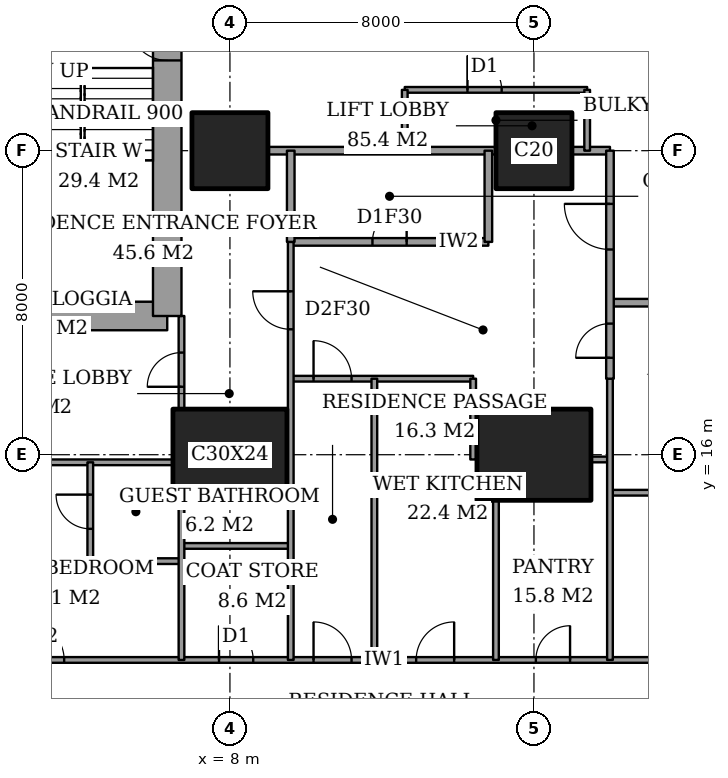
"""IFC4 building model, lengths in metres.
Left out: names, types, materials, properties, quantities, classifications, styles, units other than length and angle.
Written with IfcOpenShell. Run it as: python <this file> out.ifc"""

import sys

from ifc_helpers import new_model, si_unit, direction, frame, frame_2d, origin, origin_2d, place, context, subcontext, project, spatial, rectangle, extrude, element, fill, save


model = new_model("IFC4")
c1 = context("Model", 3, precision=1e-05, world=origin(), true_north=direction((0.0, 1.0)))
c2 = subcontext(c1, "Body", "Model", "MODEL_VIEW")
j1 = project(units=[si_unit("LENGTHUNIT", "METRE"), si_unit("PLANEANGLEUNIT", "RADIAN")], contexts=[c1])
p1 = place(None, origin())
s1 = spatial("IfcSite", under=j1, at=p1, CompositionType="ELEMENT")
p2 = place(p1, origin())
s2 = spatial("IfcBuilding", under=s1, at=p2, CompositionType="ELEMENT")
p3 = place(p2, frame((0.0, 0.0, 114.2)))
s3 = spatial("IfcBuildingStorey", under=s2, at=p3, CompositionType="ELEMENT", Elevation=114.2)
p4 = place(p3, frame((8.0, 16.0, 0.0), z_axis=(0.0, 0.0, 1.0), x_axis=(1.0, 0.0, 0.0)))
e1 = element("IfcColumn", 1, at=p4, inside=s3, PredefinedType="COLUMN", context=c2, shape_type="SweptSolid", body=[
    extrude(rectangle(XDim=3.0, YDim=2.4, at=origin_2d()), origin(), (0.0, 0.0, 1.0), 3.6),
])
p5 = place(p3, frame((8.0, 24.0, 0.0), z_axis=(0.0, 0.0, 1.0), x_axis=(1.0, 0.0, 0.0)))
e2 = element("IfcColumn", 2, at=p5, inside=s3, PredefinedType="COLUMN", context=c2, shape_type="SweptSolid", body=[
    extrude(rectangle(XDim=2.0, YDim=2.0, at=origin_2d()), origin(), (0.0, 0.0, 1.0), 3.6),
])
p6 = place(p3, frame((16.0, 16.0, 0.0), z_axis=(0.0, 0.0, 1.0), x_axis=(1.0, 0.0, 0.0)))
e3 = element("IfcColumn", 3, at=p6, inside=s3, PredefinedType="COLUMN", context=c2, shape_type="SweptSolid", body=[
    extrude(rectangle(XDim=3.0, YDim=2.4, at=origin_2d()), origin(), (0.0, 0.0, 1.0), 3.6),
])
p7 = place(p3, frame((16.0, 24.0, 0.0), z_axis=(0.0, 0.0, 1.0), x_axis=(1.0, 0.0, 0.0)))
e4 = element("IfcColumn", 4, at=p7, inside=s3, PredefinedType="COLUMN", context=c2, shape_type="SweptSolid", body=[
    extrude(rectangle(XDim=2.0, YDim=2.0, at=origin_2d()), origin(), (0.0, 0.0, 1.0), 3.6),
])
p8 = place(p3, frame((1.9, 19.65, 0.0), z_axis=(0.0, 0.0, 1.0), x_axis=(1.0, 0.0, 0.0)))
e5 = element("IfcWall", 5, at=p8, inside=s3, PredefinedType="SHEAR", context=c2, shape_type="SweptSolid", body=[
    extrude(rectangle(XDim=4.45, YDim=0.75, at=frame_2d((2.225, 0.0))), origin(), (0.0, 0.0, 1.0), 3.6),
])
p9 = place(p3, frame((6.35, 19.65, 0.0), z_axis=(0.0, 0.0, 1.0), x_axis=(0.0, 1.0, 0.0)))
e6 = element("IfcWall", 6, at=p9, inside=s3, PredefinedType="SHEAR", context=c2, shape_type="SweptSolid", body=[
    extrude(rectangle(XDim=8.7, YDim=0.75, at=frame_2d((4.35, 0.0))), origin(), (0.0, 0.0, 1.0), 3.6),
])
p10 = place(p9, frame((6.725, 0.0, 0.0)))
e7 = element("IfcOpeningElement", 7, at=p10, cuts=e6, PredefinedType="OPENING", context=c2, shape_type="SweptSolid", body=[
    extrude(rectangle(XDim=1.0, YDim=2.1, at=frame_2d((0.5, 1.05))), frame((0.0, 0.385, 0.0), z_axis=(0.0, -1.0, 0.0), x_axis=(1.0, 0.0, 0.0)), (0.0, 0.0, 1.0), 0.77),
])
p11 = place(p3, frame((-0.45, 10.6, 0.0), z_axis=(0.0, 0.0, 1.0), x_axis=(1.0, 0.0, 0.0)))
e8 = element("IfcWall", 8, at=p11, inside=s3, PredefinedType="PARTITIONING", context=c2, shape_type="SweptSolid", body=[
    extrude(rectangle(XDim=25.011, YDim=0.15, at=frame_2d((12.505, 0.0))), origin(), (0.0, 0.0, 1.0), 3.35),
])
p12 = place(p11, frame((10.65, 0.0, 0.0)))
e9 = element("IfcOpeningElement", 9, at=p12, cuts=e8, PredefinedType="OPENING", context=c2, shape_type="SweptSolid", body=[
    extrude(rectangle(XDim=1.0, YDim=2.1, at=frame_2d((0.5, 1.05))), frame((0.0, 0.085, 0.0), z_axis=(0.0, -1.0, 0.0), x_axis=(1.0, 0.0, 0.0)), (0.0, 0.0, 1.0), 0.17),
])
p13 = place(p11, frame((3.087, 0.0, 0.0)))
e10 = element("IfcOpeningElement", 10, at=p13, cuts=e8, PredefinedType="OPENING", context=c2, shape_type="SweptSolid", body=[
    extrude(rectangle(XDim=1.0, YDim=2.1, at=frame_2d((0.5, 1.05))), frame((0.0, 0.085, 0.0), z_axis=(0.0, -1.0, 0.0), x_axis=(1.0, 0.0, 0.0)), (0.0, 0.0, 1.0), 0.17),
])
p14 = place(p11, frame((8.163, 0.0, 0.0)))
e11 = element("IfcOpeningElement", 11, at=p14, cuts=e8, PredefinedType="OPENING", context=c2, shape_type="SweptSolid", body=[
    extrude(rectangle(XDim=0.9, YDim=2.1, at=frame_2d((0.45, 1.05))), frame((0.0, 0.085, 0.0), z_axis=(0.0, -1.0, 0.0), x_axis=(1.0, 0.0, 0.0)), (0.0, 0.0, 1.0), 0.17),
])
p15 = place(p11, frame((13.35, 0.0, 0.0)))
e12 = element("IfcOpeningElement", 12, at=p15, cuts=e8, PredefinedType="OPENING", context=c2, shape_type="SweptSolid", body=[
    extrude(rectangle(XDim=1.0, YDim=2.1, at=frame_2d((0.5, 1.05))), frame((0.0, 0.085, 0.0), z_axis=(0.0, -1.0, 0.0), x_axis=(1.0, 0.0, 0.0)), (0.0, 0.0, 1.0), 0.17),
])
p16 = place(p11, frame((16.5, 0.0, 0.0)))
e13 = element("IfcOpeningElement", 13, at=p16, cuts=e8, PredefinedType="OPENING", context=c2, shape_type="SweptSolid", body=[
    extrude(rectangle(XDim=0.9, YDim=2.1, at=frame_2d((0.45, 1.05))), frame((0.0, 0.085, 0.0), z_axis=(0.0, -1.0, 0.0), x_axis=(1.0, 0.0, 0.0)), (0.0, 0.0, 1.0), 0.17),
])
p17 = place(p11, frame((21.175, 0.0, 0.0)))
e14 = element("IfcOpeningElement", 14, at=p17, cuts=e8, PredefinedType="OPENING", context=c2, shape_type="SweptSolid", body=[
    extrude(rectangle(XDim=1.0, YDim=2.1, at=frame_2d((0.5, 1.05))), frame((0.0, 0.085, 0.0), z_axis=(0.0, -1.0, 0.0), x_axis=(1.0, 0.0, 0.0)), (0.0, 0.0, 1.0), 0.17),
])
p18 = place(p3, frame((4.325, 13.2, 0.0), z_axis=(0.0, 0.0, 1.0), x_axis=(1.0, 0.0, 0.0)))
e15 = element("IfcWall", 15, at=p18, inside=s3, PredefinedType="PARTITIONING", context=c2, shape_type="SweptSolid", body=[
    extrude(rectangle(XDim=2.4, YDim=0.15, at=frame_2d((1.2, 0.0))), origin(), (0.0, 0.0, 1.0), 3.35),
])
p19 = place(p3, frame((6.725, 13.6, 0.0), z_axis=(0.0, 0.0, 1.0), x_axis=(1.0, 0.0, 0.0)))
e16 = element("IfcWall", 16, at=p19, inside=s3, PredefinedType="PARTITIONING", context=c2, shape_type="SweptSolid", body=[
    extrude(rectangle(XDim=2.875, YDim=0.15, at=frame_2d((1.438, 0.0))), origin(), (0.0, 0.0, 1.0), 3.35),
])
p20 = place(p3, frame((18.0, 15.0, 0.0), z_axis=(0.0, 0.0, 1.0), x_axis=(1.0, 0.0, 0.0)))
e17 = element("IfcWall", 17, at=p20, inside=s3, PredefinedType="PARTITIONING", context=c2, shape_type="SweptSolid", body=[
    extrude(rectangle(XDim=6.0, YDim=0.15, at=frame_2d((3.0, 0.0))), origin(), (0.0, 0.0, 1.0), 3.35),
])
p21 = place(p3, frame((1.35, 15.8, 0.0), z_axis=(0.0, 0.0, 1.0), x_axis=(1.0, 0.0, 0.0)))
e18 = element("IfcWall", 18, at=p21, inside=s3, PredefinedType="PARTITIONING", context=c2, shape_type="SweptSolid", body=[
    extrude(rectangle(XDim=5.15, YDim=0.15, at=frame_2d((2.575, 0.0))), origin(), (0.0, 0.0, 1.0), 3.35),
])
p22 = place(p3, frame((17.5, 15.875, 0.0), z_axis=(0.0, 0.0, 1.0), x_axis=(1.0, 0.0, 0.0)))
e19 = element("IfcWall", 19, at=p22, inside=s3, PredefinedType="PARTITIONING", context=c2, shape_type="SweptSolid", body=[
    extrude(rectangle(XDim=0.5, YDim=0.15, at=frame_2d((0.25, 0.0))), origin(), (0.0, 0.0, 1.0), 2.634),
])
p23 = place(p3, frame((9.6, 18.0, 0.0), z_axis=(0.0, 0.0, 1.0), x_axis=(1.0, 0.0, 0.0)))
e20 = element("IfcWall", 20, at=p23, inside=s3, PredefinedType="PARTITIONING", context=c2, shape_type="SweptSolid", body=[
    extrude(rectangle(XDim=4.8, YDim=0.15, at=frame_2d((2.4, 0.0))), origin(), (0.0, 0.0, 1.0), 3.35),
])
p24 = place(p23, frame((0.6, 0.0, 0.0)))
e21 = element("IfcOpeningElement", 21, at=p24, cuts=e20, PredefinedType="OPENING", context=c2, shape_type="SweptSolid", body=[
    extrude(rectangle(XDim=1.0, YDim=2.1, at=frame_2d((0.5, 1.05))), frame((0.0, 0.085, 0.0), z_axis=(0.0, -1.0, 0.0), x_axis=(1.0, 0.0, 0.0)), (0.0, 0.0, 1.0), 0.17),
])
p25 = place(p3, frame((18.0, 20.0, 0.0), z_axis=(0.0, 0.0, 1.0), x_axis=(1.0, 0.0, 0.0)))
e22 = element("IfcWall", 22, at=p25, inside=s3, PredefinedType="PARTITIONING", context=c2, shape_type="SweptSolid", body=[
    extrude(rectangle(XDim=6.0, YDim=0.2, at=frame_2d((3.0, 0.0))), origin(), (0.0, 0.0, 1.0), 3.35),
])
p26 = place(p3, frame((9.6, 21.6, 0.0), z_axis=(0.0, 0.0, 1.0), x_axis=(1.0, 0.0, 0.0)))
e23 = element("IfcWall", 23, at=p26, inside=s3, PredefinedType="PARTITIONING", context=c2, shape_type="SweptSolid", body=[
    extrude(rectangle(XDim=5.2, YDim=0.2, at=frame_2d((2.6, 0.0))), origin(), (0.0, 0.0, 1.0), 3.35),
])
p27 = place(p26, frame((2.15, 0.0, 0.0)))
e24 = element("IfcOpeningElement", 24, at=p27, cuts=e23, PredefinedType="OPENING", context=c2, shape_type="SweptSolid", body=[
    extrude(rectangle(XDim=0.9, YDim=2.1, at=frame_2d((0.45, 1.05))), frame((0.0, 0.11, 0.0), z_axis=(0.0, -1.0, 0.0), x_axis=(1.0, 0.0, 0.0)), (0.0, 0.0, 1.0), 0.22),
])
p28 = place(p3, frame((9.0, 24.0, 0.0), z_axis=(0.0, 0.0, 1.0), x_axis=(1.0, 0.0, 0.0)))
e25 = element("IfcWall", 25, at=p28, inside=s3, PredefinedType="PARTITIONING", context=c2, shape_type="SweptSolid", body=[
    extrude(rectangle(XDim=6.0, YDim=0.2, at=frame_2d((3.0, 0.0))), origin(), (0.0, 0.0, 1.0), 3.35),
])
p29 = place(p3, frame((17.0, 24.0, 0.0), z_axis=(0.0, 0.0, 1.0), x_axis=(1.0, 0.0, 0.0)))
e26 = element("IfcWall", 26, at=p29, inside=s3, PredefinedType="PARTITIONING", context=c2, shape_type="SweptSolid", body=[
    extrude(rectangle(XDim=1.0, YDim=0.2, at=frame_2d((0.5, 0.0))), origin(), (0.0, 0.0, 1.0), 3.35),
])
p30 = place(p3, frame((12.6, 25.6, 0.0), z_axis=(0.0, 0.0, 1.0), x_axis=(1.0, 0.0, 0.0)))
e27 = element("IfcWall", 27, at=p30, inside=s3, PredefinedType="PARTITIONING", context=c2, shape_type="SweptSolid", body=[
    extrude(rectangle(XDim=4.8, YDim=0.15, at=frame_2d((2.4, 0.0))), origin(), (0.0, 0.0, 1.0), 3.35),
])
p31 = place(p30, frame((1.65, 0.0, 0.0)))
e28 = element("IfcOpeningElement", 28, at=p31, cuts=e27, PredefinedType="OPENING", context=c2, shape_type="SweptSolid", body=[
    extrude(rectangle(XDim=0.9, YDim=2.1, at=frame_2d((0.45, 1.05))), frame((0.0, 0.085, 0.0), z_axis=(0.0, -1.0, 0.0), x_axis=(1.0, 0.0, 0.0)), (0.0, 0.0, 1.0), 0.17),
])
p32 = place(p3, frame((4.325, 13.2, 0.0), z_axis=(0.0, 0.0, 1.0), x_axis=(0.0, 1.0, 0.0)))
e29 = element("IfcWall", 29, at=p32, inside=s3, PredefinedType="PARTITIONING", context=c2, shape_type="SweptSolid", body=[
    extrude(rectangle(XDim=2.6, YDim=0.15, at=frame_2d((1.3, 0.0))), origin(), (0.0, 0.0, 1.0), 3.35),
])
p33 = place(p32, frame((0.85, 0.0, 0.0)))
e30 = element("IfcOpeningElement", 30, at=p33, cuts=e29, PredefinedType="OPENING", context=c2, shape_type="SweptSolid", body=[
    extrude(rectangle(XDim=0.9, YDim=2.1, at=frame_2d((0.45, 1.05))), frame((0.0, 0.085, 0.0), z_axis=(0.0, -1.0, 0.0), x_axis=(1.0, 0.0, 0.0)), (0.0, 0.0, 1.0), 0.17),
])
p34 = place(p3, frame((6.725, 10.6, 0.0), z_axis=(0.0, 0.0, 1.0), x_axis=(0.0, 1.0, 0.0)))
e31 = element("IfcWall", 31, at=p34, inside=s3, PredefinedType="PARTITIONING", context=c2, shape_type="SweptSolid", body=[
    extrude(rectangle(XDim=4.2, YDim=0.15, at=frame_2d((2.1, 0.0))), origin(), (0.0, 0.0, 1.0), 3.35),
])
p35 = place(p3, frame((6.725, 17.2, 0.0), z_axis=(0.0, 0.0, 1.0), x_axis=(0.0, 1.0, 0.0)))
e32 = element("IfcWall", 32, at=p35, inside=s3, PredefinedType="PARTITIONING", context=c2, shape_type="SweptSolid", body=[
    extrude(rectangle(XDim=2.45, YDim=0.15, at=frame_2d((1.225, 0.0))), origin(), (0.0, 0.0, 1.0), 3.35),
])
p36 = place(p35, frame((0.587, 0.0, 0.0)))
e33 = element("IfcOpeningElement", 33, at=p36, cuts=e32, PredefinedType="OPENING", context=c2, shape_type="SweptSolid", body=[
    extrude(rectangle(XDim=0.9, YDim=2.1, at=frame_2d((0.45, 1.05))), frame((0.0, 0.085, 0.0), z_axis=(0.0, -1.0, 0.0), x_axis=(1.0, 0.0, 0.0)), (0.0, 0.0, 1.0), 0.17),
])
p37 = place(p3, frame((9.6, 21.6, 0.0), z_axis=(0.0, 0.0, 1.0), x_axis=(0.0, 1.0, 0.0)))
e34 = element("IfcWall", 34, at=p37, inside=s3, PredefinedType="PARTITIONING", context=c2, shape_type="SweptSolid", body=[
    extrude(rectangle(XDim=2.4, YDim=0.2, at=frame_2d((1.2, 0.0))), origin(), (0.0, 0.0, 1.0), 3.35),
])
p38 = place(p3, frame((9.6, 10.6, 0.0), z_axis=(0.0, 0.0, 1.0), x_axis=(0.0, 1.0, 0.0)))
e35 = element("IfcWall", 35, at=p38, inside=s3, PredefinedType="PARTITIONING", context=c2, shape_type="SweptSolid", body=[
    extrude(rectangle(XDim=11.0, YDim=0.15, at=frame_2d((5.5, 0.0))), origin(), (0.0, 0.0, 1.0), 3.35),
])
p39 = place(p38, frame((8.7, 0.0, 0.0)))
e36 = element("IfcOpeningElement", 36, at=p39, cuts=e35, PredefinedType="OPENING", context=c2, shape_type="SweptSolid", body=[
    extrude(rectangle(XDim=1.0, YDim=2.1, at=frame_2d((0.5, 1.05))), frame((0.0, 0.085, 0.0), z_axis=(0.0, -1.0, 0.0), x_axis=(1.0, 0.0, 0.0)), (0.0, 0.0, 1.0), 0.17),
])
p40 = place(p3, frame((11.8, 10.6, 0.0), z_axis=(0.0, 0.0, 1.0), x_axis=(0.0, 1.0, 0.0)))
e37 = element("IfcWall", 37, at=p40, inside=s3, PredefinedType="PARTITIONING", context=c2, shape_type="SweptSolid", body=[
    extrude(rectangle(XDim=7.4, YDim=0.15, at=frame_2d((3.7, 0.0))), origin(), (0.0, 0.0, 1.0), 3.35),
])
p41 = place(p3, frame((12.6, 24.0, 0.0), z_axis=(0.0, 0.0, 1.0), x_axis=(0.0, 1.0, 0.0)))
e38 = element("IfcWall", 38, at=p41, inside=s3, PredefinedType="PARTITIONING", context=c2, shape_type="SweptSolid", body=[
    extrude(rectangle(XDim=1.6, YDim=0.15, at=frame_2d((0.8, 0.0))), origin(), (0.0, 0.0, 1.0), 3.35),
])
p42 = place(p3, frame((14.4, 15.875, 0.0), z_axis=(0.0, 0.0, 1.0), x_axis=(0.0, 1.0, 0.0)))
e39 = element("IfcWall", 39, at=p42, inside=s3, PredefinedType="PARTITIONING", context=c2, shape_type="SweptSolid", body=[
    extrude(rectangle(XDim=2.125, YDim=0.15, at=frame_2d((1.062, 0.0))), origin(), (0.0, 0.0, 1.0), 3.35),
])
p43 = place(p3, frame((14.8, 21.6, 0.0), z_axis=(0.0, 0.0, 1.0), x_axis=(0.0, 1.0, 0.0)))
e40 = element("IfcWall", 40, at=p43, inside=s3, PredefinedType="PARTITIONING", context=c2, shape_type="SweptSolid", body=[
    extrude(rectangle(XDim=2.4, YDim=0.2, at=frame_2d((1.2, 0.0))), origin(), (0.0, 0.0, 1.0), 3.35),
])
p44 = place(p3, frame((15.0, 10.6, 0.0), z_axis=(0.0, 0.0, 1.0), x_axis=(0.0, 1.0, 0.0)))
e41 = element("IfcWall", 41, at=p44, inside=s3, PredefinedType="PARTITIONING", context=c2, shape_type="SweptSolid", body=[
    extrude(rectangle(XDim=4.2, YDim=0.15, at=frame_2d((2.1, 0.0))), origin(), (0.0, 0.0, 1.0), 3.35),
])
p45 = place(p3, frame((17.4, 24.0, 0.0), z_axis=(0.0, 0.0, 1.0), x_axis=(0.0, 1.0, 0.0)))
e42 = element("IfcWall", 42, at=p45, inside=s3, PredefinedType="PARTITIONING", context=c2, shape_type="SweptSolid", body=[
    extrude(rectangle(XDim=1.6, YDim=0.15, at=frame_2d((0.8, 0.0))), origin(), (0.0, 0.0, 1.0), 3.35),
])
p46 = place(p3, frame((18.0, 18.0, 0.0), z_axis=(0.0, 0.0, 1.0), x_axis=(0.0, 1.0, 0.0)))
e43 = element("IfcWall", 43, at=p46, inside=s3, PredefinedType="PARTITIONING", context=c2, shape_type="SweptSolid", body=[
    extrude(rectangle(XDim=6.0, YDim=0.2, at=frame_2d((3.0, 0.0))), origin(), (0.0, 0.0, 1.0), 3.35),
])
p47 = place(p46, frame((3.4, 0.0, 0.0)))
e44 = element("IfcOpeningElement", 44, at=p47, cuts=e43, PredefinedType="OPENING", context=c2, shape_type="SweptSolid", body=[
    extrude(rectangle(XDim=1.2, YDim=2.4, at=frame_2d((0.6, 1.2))), frame((0.0, 0.11, 0.0), z_axis=(0.0, -1.0, 0.0), x_axis=(1.0, 0.0, 0.0)), (0.0, 0.0, 1.0), 0.22),
])
p48 = place(p46, frame((0.55, 0.0, 0.0)))
e45 = element("IfcOpeningElement", 45, at=p48, cuts=e43, PredefinedType="OPENING", context=c2, shape_type="SweptSolid", body=[
    extrude(rectangle(XDim=0.9, YDim=2.1, at=frame_2d((0.45, 1.05))), frame((0.0, 0.11, 0.0), z_axis=(0.0, -1.0, 0.0), x_axis=(1.0, 0.0, 0.0)), (0.0, 0.0, 1.0), 0.22),
])
p49 = place(p3, frame((18.0, 10.6, 0.0), z_axis=(0.0, 0.0, 1.0), x_axis=(0.0, 1.0, 0.0)))
e46 = element("IfcWall", 46, at=p49, inside=s3, PredefinedType="PARTITIONING", context=c2, shape_type="SweptSolid", body=[
    extrude(rectangle(XDim=7.4, YDim=0.15, at=frame_2d((3.7, 0.0))), origin(), (0.0, 0.0, 1.0), 3.35),
])
p50 = place(p12, origin())
e47 = element("IfcDoor", 47, at=p50, inside=s3, OperationType="SINGLE_SWING_RIGHT", PredefinedType="DOOR", context=c2, shape_type="SweptSolid", body=[
    extrude(rectangle(XDim=1.0, YDim=2.1, at=frame_2d((0.5, 1.05))), frame((0.0, 0.025, 0.0), z_axis=(0.0, -1.0, 0.0), x_axis=(1.0, 0.0, 0.0)), (0.0, 0.0, 1.0), 0.05),
])
fill(e9, e47)
p51 = place(p33, origin())
e48 = element("IfcDoor", 48, at=p51, inside=s3, OperationType="SINGLE_SWING_LEFT", PredefinedType="DOOR", context=c2, shape_type="SweptSolid", body=[
    extrude(rectangle(XDim=0.9, YDim=2.1, at=frame_2d((0.45, 1.05))), frame((0.0, 0.025, 0.0), z_axis=(0.0, -1.0, 0.0), x_axis=(1.0, 0.0, 0.0)), (0.0, 0.0, 1.0), 0.05),
])
fill(e30, e48)
p52 = place(p13, origin())
e49 = element("IfcDoor", 49, at=p52, inside=s3, OperationType="SINGLE_SWING_RIGHT", PredefinedType="DOOR", context=c2, shape_type="SweptSolid", body=[
    extrude(rectangle(XDim=1.0, YDim=2.1, at=frame_2d((0.5, 1.05))), frame((0.0, 0.025, 0.0), z_axis=(0.0, -1.0, 0.0), x_axis=(1.0, 0.0, 0.0)), (0.0, 0.0, 1.0), 0.05),
])
fill(e10, e49)
p53 = place(p36, origin())
e50 = element("IfcDoor", 50, at=p53, inside=s3, OperationType="SINGLE_SWING_RIGHT", PredefinedType="DOOR", context=c2, shape_type="SweptSolid", body=[
    extrude(rectangle(XDim=0.9, YDim=2.1, at=frame_2d((0.45, 1.05))), frame((0.0, 0.025, 0.0), z_axis=(0.0, -1.0, 0.0), x_axis=(1.0, 0.0, 0.0)), (0.0, 0.0, 1.0), 0.05),
])
fill(e33, e50)
p54 = place(p14, origin())
e51 = element("IfcDoor", 51, at=p54, inside=s3, OperationType="SINGLE_SWING_RIGHT", PredefinedType="DOOR", context=c2, shape_type="SweptSolid", body=[
    extrude(rectangle(XDim=0.9, YDim=2.1, at=frame_2d((0.45, 1.05))), frame((0.0, 0.025, 0.0), z_axis=(0.0, -1.0, 0.0), x_axis=(1.0, 0.0, 0.0)), (0.0, 0.0, 1.0), 0.05),
])
fill(e11, e51)
p55 = place(p39, origin())
e52 = element("IfcDoor", 52, at=p55, inside=s3, OperationType="SINGLE_SWING_LEFT", PredefinedType="DOOR", context=c2, shape_type="SweptSolid", body=[
    extrude(rectangle(XDim=1.0, YDim=2.1, at=frame_2d((0.5, 1.05))), frame((0.0, 0.025, 0.0), z_axis=(0.0, -1.0, 0.0), x_axis=(1.0, 0.0, 0.0)), (0.0, 0.0, 1.0), 0.05),
])
fill(e36, e52)
p56 = place(p27, origin())
e53 = element("IfcDoor", 53, at=p56, inside=s3, OperationType="SINGLE_SWING_LEFT", PredefinedType="DOOR", context=c2, shape_type="SweptSolid", body=[
    extrude(rectangle(XDim=0.9, YDim=2.1, at=frame_2d((0.45, 1.05))), frame((0.0, 0.025, 0.0), z_axis=(0.0, -1.0, 0.0), x_axis=(1.0, 0.0, 0.0)), (0.0, 0.0, 1.0), 0.05),
])
fill(e24, e53)
p57 = place(p47, origin())
e54 = element("IfcDoor", 54, at=p57, inside=s3, OperationType="SINGLE_SWING_LEFT", PredefinedType="DOOR", context=c2, shape_type="SweptSolid", body=[
    extrude(rectangle(XDim=1.2, YDim=2.4, at=frame_2d((0.6, 1.2))), frame((0.0, 0.025, 0.0), z_axis=(0.0, -1.0, 0.0), x_axis=(1.0, 0.0, 0.0)), (0.0, 0.0, 1.0), 0.05),
])
fill(e44, e54)
p58 = place(p24, origin())
e55 = element("IfcDoor", 55, at=p58, inside=s3, OperationType="SINGLE_SWING_RIGHT", PredefinedType="DOOR", context=c2, shape_type="SweptSolid", body=[
    extrude(rectangle(XDim=1.0, YDim=2.1, at=frame_2d((0.5, 1.05))), frame((0.0, 0.025, 0.0), z_axis=(0.0, -1.0, 0.0), x_axis=(1.0, 0.0, 0.0)), (0.0, 0.0, 1.0), 0.05),
])
fill(e21, e55)
p59 = place(p15, origin())
e56 = element("IfcDoor", 56, at=p59, inside=s3, OperationType="SINGLE_SWING_LEFT", PredefinedType="DOOR", context=c2, shape_type="SweptSolid", body=[
    extrude(rectangle(XDim=1.0, YDim=2.1, at=frame_2d((0.5, 1.05))), frame((0.0, 0.025, 0.0), z_axis=(0.0, -1.0, 0.0), x_axis=(1.0, 0.0, 0.0)), (0.0, 0.0, 1.0), 0.05),
])
fill(e12, e56)
p60 = place(p16, origin())
e57 = element("IfcDoor", 57, at=p60, inside=s3, OperationType="SINGLE_SWING_LEFT", PredefinedType="DOOR", context=c2, shape_type="SweptSolid", body=[
    extrude(rectangle(XDim=0.9, YDim=2.1, at=frame_2d((0.45, 1.05))), frame((0.0, 0.025, 0.0), z_axis=(0.0, -1.0, 0.0), x_axis=(1.0, 0.0, 0.0)), (0.0, 0.0, 1.0), 0.05),
])
fill(e13, e57)
p61 = place(p48, origin())
e58 = element("IfcDoor", 58, at=p61, inside=s3, OperationType="SINGLE_SWING_RIGHT", PredefinedType="DOOR", context=c2, shape_type="SweptSolid", body=[
    extrude(rectangle(XDim=0.9, YDim=2.1, at=frame_2d((0.45, 1.05))), frame((0.0, 0.025, 0.0), z_axis=(0.0, -1.0, 0.0), x_axis=(1.0, 0.0, 0.0)), (0.0, 0.0, 1.0), 0.05),
])
fill(e45, e58)
p62 = place(p31, origin())
e59 = element("IfcDoor", 59, at=p62, inside=s3, OperationType="SINGLE_SWING_RIGHT", PredefinedType="DOOR", context=c2, shape_type="SweptSolid", body=[
    extrude(rectangle(XDim=0.9, YDim=2.1, at=frame_2d((0.45, 1.05))), frame((0.0, 0.025, 0.0), z_axis=(0.0, -1.0, 0.0), x_axis=(1.0, 0.0, 0.0)), (0.0, 0.0, 1.0), 0.05),
])
fill(e28, e59)
p63 = place(p10, origin())
e60 = element("IfcDoor", 60, at=p63, inside=s3, OperationType="SINGLE_SWING_LEFT", PredefinedType="DOOR", context=c2, shape_type="SweptSolid", body=[
    extrude(rectangle(XDim=1.0, YDim=2.1, at=frame_2d((0.5, 1.05))), frame((0.0, 0.025, 0.0), z_axis=(0.0, -1.0, 0.0), x_axis=(1.0, 0.0, 0.0)), (0.0, 0.0, 1.0), 0.05),
])
fill(e7, e60)
save(model, sys.argv[1])
